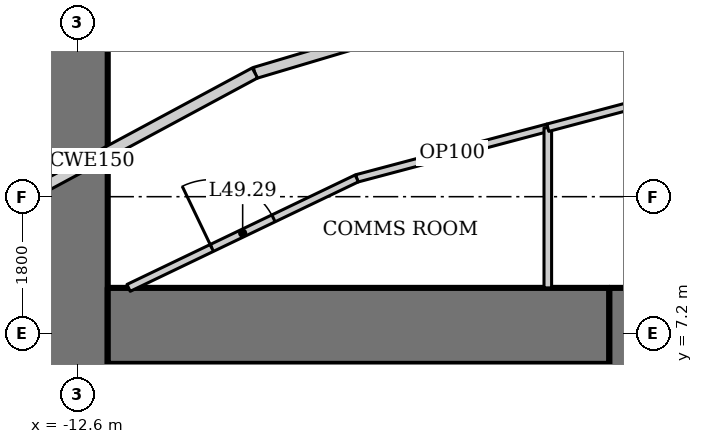
"""IFC4 building model, lengths in metres.
Left out: names, types, materials, properties, quantities, classifications, styles, units other than length and angle.
Written with IfcOpenShell. Run it as: python <this file> out.ifc"""

import sys

from ifc_helpers import new_model, si_unit, direction, frame, frame_2d, origin, place, context, subcontext, project, spatial, rectangle, extrude, element, fill, save


model = new_model("IFC4")
c1 = context("Model", 3, precision=1e-05, world=origin(), true_north=direction((0.0, 1.0)))
c2 = subcontext(c1, "Body", "Model", "MODEL_VIEW")
j1 = project(units=[si_unit("LENGTHUNIT", "METRE"), si_unit("PLANEANGLEUNIT", "RADIAN")], contexts=[c1])
p1 = place(None, origin())
s1 = spatial("IfcSite", under=j1, at=p1, CompositionType="ELEMENT")
p2 = place(p1, origin())
s2 = spatial("IfcBuilding", under=s1, at=p2, CompositionType="ELEMENT")
p3 = place(p2, frame((0.0, 0.0, 211.6)))
s3 = spatial("IfcBuildingStorey", under=s2, at=p3, CompositionType="ELEMENT", Elevation=211.6)
p4 = place(p3, frame((-12.6, 13.0, 0.0), z_axis=(0.0, 0.0, 1.0), x_axis=(0.0, -1.0, 0.0)))
e1 = element("IfcWall", 1, at=p4, inside=s3, PredefinedType="SHEAR", context=c2, shape_type="SweptSolid", body=[
    extrude(rectangle(XDim=26.0, YDim=0.8, at=frame_2d((13.0, 0.0))), origin(), (0.0, 0.0, 1.0), 4.2),
])
p5 = place(p4, frame((12.1, 0.0, 0.0)))
e2 = element("IfcOpeningElement", 2, at=p5, cuts=e1, PredefinedType="OPENING", context=c2, shape_type="SweptSolid", body=[
    extrude(rectangle(XDim=1.8, YDim=2.1, at=frame_2d((0.9, 1.05))), frame((0.0, 0.41, 0.0), z_axis=(0.0, -1.0, 0.0), x_axis=(1.0, 0.0, 0.0)), (0.0, 0.0, 1.0), 0.82),
])
p6 = place(p3, frame((-5.6, 7.3, 0.0), z_axis=(0.0, 0.0, 1.0), x_axis=(-1.0, 0.0, 0.0)))
e3 = element("IfcWall", 3, at=p6, inside=s3, PredefinedType="SHEAR", context=c2, shape_type="SweptSolid", body=[
    extrude(rectangle(XDim=6.6, YDim=1.0, at=frame_2d((3.3, 0.0))), origin(), (0.0, 0.0, 1.0), 4.2),
])
p7 = place(p3, frame((-5.4, 7.8, 0.0), z_axis=(0.0, 0.0, 1.0), x_axis=(0.0, -1.0, 0.0)))
e4 = element("IfcWall", 4, at=p7, inside=s3, PredefinedType="SHEAR", context=c2, shape_type="SweptSolid", body=[
    extrude(rectangle(XDim=14.6, YDim=0.4, at=frame_2d((7.3, 0.0))), origin(), (0.0, 0.0, 1.0), 4.2),
])
p8 = place(p7, frame((6.4, 0.0, 0.0)))
e5 = element("IfcOpeningElement", 5, at=p8, cuts=e4, PredefinedType="OPENING", context=c2, shape_type="SweptSolid", body=[
    extrude(rectangle(XDim=1.8, YDim=2.1, at=frame_2d((0.9, 1.05))), frame((0.0, 0.21, 0.0), z_axis=(0.0, -1.0, 0.0), x_axis=(1.0, 0.0, 0.0)), (0.0, 0.0, 1.0), 0.42),
])
p9 = place(p3, frame((-6.054, 11.882, 0.0), z_axis=(0.0, 0.0, 1.0), x_axis=(-0.958384389306, -0.285480931648, 0.0)))
e6 = element("IfcWall", 6, at=p9, inside=s3, PredefinedType="PARTITIONING", context=c2, shape_type="SweptSolid", body=[
    extrude(rectangle(XDim=4.392, YDim=0.15, at=frame_2d((2.196, 0.0))), origin(), (0.0, 0.0, 1.0), 4.05),
])
p10 = place(p3, frame((-10.264, 10.628, 0.0), z_axis=(0.0, 0.0, 1.0), x_axis=(-0.88053863253, -0.47397438393, 0.0)))
e7 = element("IfcWall", 7, at=p10, inside=s3, PredefinedType="PARTITIONING", context=c2, shape_type="SweptSolid", body=[
    extrude(rectangle(XDim=4.875, YDim=0.15, at=frame_2d((2.438, 0.0))), origin(), (0.0, 0.0, 1.0), 4.05),
])
p11 = place(p3, frame((-8.924, 9.241, 0.0), z_axis=(0.0, 0.0, 1.0), x_axis=(0.966575327783, 0.256382791392, 0.0)))
e8 = element("IfcWall", 8, at=p11, inside=s3, PredefinedType="PARTITIONING", context=c2, shape_type="SweptSolid", body=[
    extrude(rectangle(XDim=2.601, YDim=0.1, at=frame_2d((1.3, 0.0))), origin(), (0.0, 0.0, 1.0), 4.05),
])
p12 = place(p3, frame((-6.41, 9.907, 0.0), z_axis=(0.0, 0.0, 1.0), x_axis=(0.0, -1.0, 0.0)))
e9 = element("IfcWall", 9, at=p12, inside=s3, PredefinedType="PARTITIONING", context=c2, shape_type="SweptSolid", body=[
    extrude(rectangle(XDim=2.107, YDim=0.1, at=frame_2d((1.054, 0.0))), origin(), (0.0, 0.0, 1.0), 4.05),
])
p13 = place(p3, frame((-11.926, 7.8, 0.0), z_axis=(0.0, 0.0, 1.0), x_axis=(0.901553947207, 0.432666708073, 0.0)))
e10 = element("IfcWall", 10, at=p13, inside=s3, PredefinedType="PARTITIONING", context=c2, shape_type="SweptSolid", body=[
    extrude(rectangle(XDim=3.33, YDim=0.1, at=frame_2d((1.665, 0.0))), origin(), (0.0, 0.0, 1.0), 4.05),
])
p14 = place(p13, frame((1.215, 0.0, 0.0)))
e11 = element("IfcOpeningElement", 11, at=p14, cuts=e10, PredefinedType="OPENING", context=c2, shape_type="SweptSolid", body=[
    extrude(rectangle(XDim=0.9, YDim=2.1, at=frame_2d((0.45, 1.05))), frame((0.0, 0.06, 0.0), z_axis=(0.0, -1.0, 0.0), x_axis=(1.0, 0.0, 0.0)), (0.0, 0.0, 1.0), 0.12),
])
p15 = place(p3, frame((-6.41, 9.907, 0.0), z_axis=(0.0, 0.0, 1.0), x_axis=(0.966534683979, 0.256535971486, 0.0)))
e12 = element("IfcWall", 12, at=p15, inside=s3, PredefinedType="PARTITIONING", context=c2, shape_type="SweptSolid", body=[
    extrude(rectangle(XDim=1.241, YDim=0.1, at=frame_2d((0.621, 0.0))), origin(), (0.0, 0.0, 1.0), 4.05),
])
p16 = place(p14, origin())
e13 = element("IfcDoor", 13, at=p16, inside=s3, OperationType="SINGLE_SWING_LEFT", PredefinedType="DOOR", context=c2, shape_type="SweptSolid", body=[
    extrude(rectangle(XDim=0.9, YDim=2.1, at=frame_2d((0.45, 1.05))), frame((0.0, 0.025, 0.0), z_axis=(0.0, -1.0, 0.0), x_axis=(1.0, 0.0, 0.0)), (0.0, 0.0, 1.0), 0.05),
])
fill(e11, e13)
save(model, sys.argv[1])
